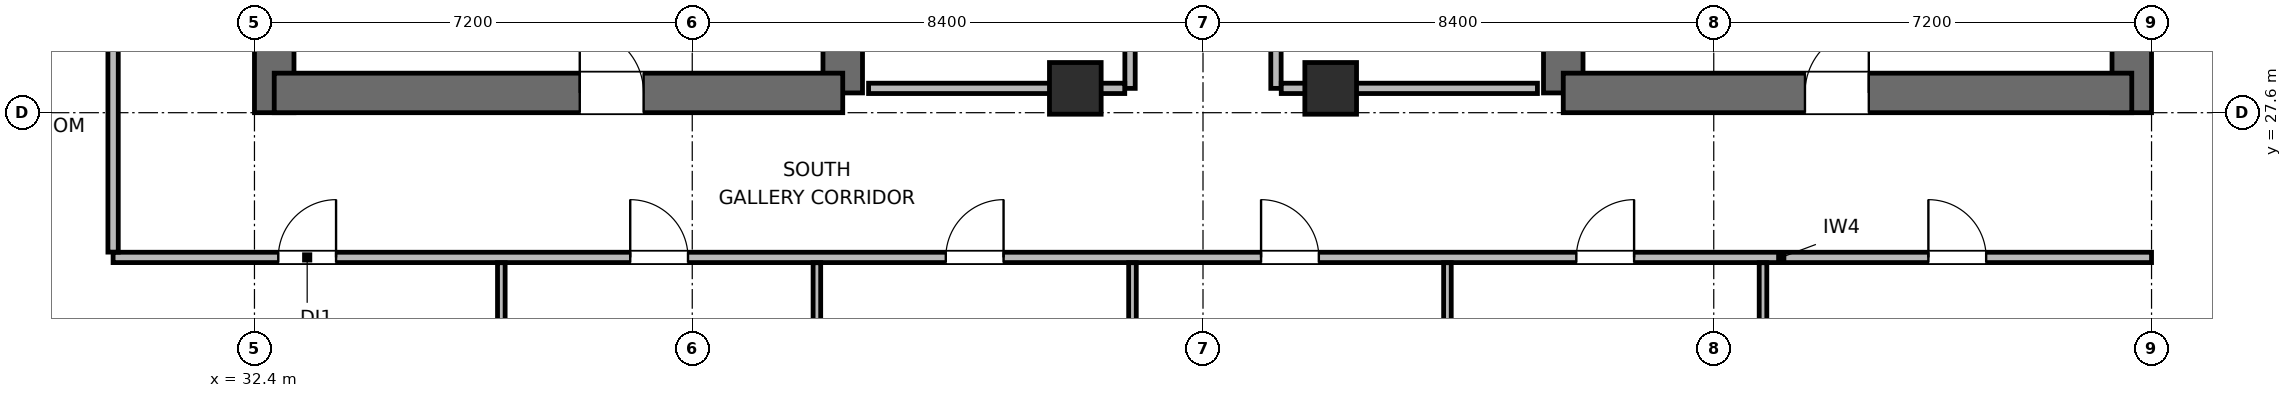
"""IFC4 building model, lengths in metres.
Left out: names, types, materials, properties, quantities, classifications, styles, units other than length and angle.
Written with IfcOpenShell. Run it as: python <this file> out.ifc"""

import sys

from ifc_helpers import new_model, si_unit, direction, frame, frame_2d, origin, origin_2d, place, context, subcontext, project, spatial, rectangle, extrude, element, fill, save


model = new_model("IFC4")
c1 = context("Model", 3, precision=1e-05, world=origin(), true_north=direction((0.0, 1.0)))
c2 = subcontext(c1, "Body", "Model", "MODEL_VIEW")
j1 = project(units=[si_unit("LENGTHUNIT", "METRE"), si_unit("PLANEANGLEUNIT", "RADIAN")], contexts=[c1])
p1 = place(None, origin())
s1 = spatial("IfcSite", under=j1, at=p1, CompositionType="ELEMENT")
p2 = place(p1, origin())
s2 = spatial("IfcBuilding", under=s1, at=p2, CompositionType="ELEMENT")
p3 = place(p2, frame((0.0, 0.0, 247.2)))
s3 = spatial("IfcBuildingStorey", under=s2, at=p3, CompositionType="ELEMENT", Elevation=247.2)
p4 = place(p3, frame((32.725, 27.6, 0.0), z_axis=(0.0, 0.0, 1.0), x_axis=(0.0, 1.0, 0.0)))
e1 = element("IfcWall", 1, at=p4, inside=s3, PredefinedType="SHEAR", context=c2, shape_type="SweptSolid", body=[
    extrude(rectangle(XDim=16.8, YDim=0.65, at=frame_2d((8.4, 0.0))), origin(), (0.0, 0.0, 1.0), 3.9),
])
p5 = place(p3, frame((42.075, 27.925, 0.0), z_axis=(0.0, 0.0, 1.0), x_axis=(0.0, 1.0, 0.0)))
e2 = element("IfcWall", 2, at=p5, inside=s3, PredefinedType="SHEAR", context=c2, shape_type="SweptSolid", body=[
    extrude(rectangle(XDim=6.475, YDim=0.65, at=frame_2d((3.237, 0.0))), origin(), (0.0, 0.0, 1.0), 3.9),
])
p6 = place(p3, frame((32.725, 27.925, 0.0), z_axis=(0.0, 0.0, 1.0), x_axis=(1.0, 0.0, 0.0)))
e3 = element("IfcWall", 3, at=p6, inside=s3, PredefinedType="SHEAR", context=c2, shape_type="SweptSolid", body=[
    extrude(rectangle(XDim=9.35, YDim=0.65, at=frame_2d((4.675, 0.0))), origin(), (0.0, 0.0, 1.0), 3.9),
])
p7 = place(p6, frame((5.025, 0.0, 0.0)))
e4 = element("IfcOpeningElement", 4, at=p7, cuts=e3, PredefinedType="OPENING", context=c2, shape_type="SweptSolid", body=[
    extrude(rectangle(XDim=1.05, YDim=2.04, at=frame_2d((0.525, 1.02))), frame((0.0, 0.335, 0.0), z_axis=(0.0, -1.0, 0.0), x_axis=(1.0, 0.0, 0.0)), (0.0, 0.0, 1.0), 0.67),
])
p8 = place(p3, frame((53.925, 27.925, 0.0), z_axis=(0.0, 0.0, 1.0), x_axis=(0.0, 1.0, 0.0)))
e5 = element("IfcWall", 5, at=p8, inside=s3, PredefinedType="SHEAR", context=c2, shape_type="SweptSolid", body=[
    extrude(rectangle(XDim=7.875, YDim=0.65, at=frame_2d((3.938, 0.0))), origin(), (0.0, 0.0, 1.0), 3.9),
])
p9 = place(p3, frame((63.275, 27.6, 0.0), z_axis=(0.0, 0.0, 1.0), x_axis=(0.0, 1.0, 0.0)))
e6 = element("IfcWall", 6, at=p9, inside=s3, PredefinedType="SHEAR", context=c2, shape_type="SweptSolid", body=[
    extrude(rectangle(XDim=16.8, YDim=0.65, at=frame_2d((8.4, 0.0))), origin(), (0.0, 0.0, 1.0), 3.9),
])
p10 = place(p3, frame((53.925, 27.925, 0.0), z_axis=(0.0, 0.0, 1.0), x_axis=(1.0, 0.0, 0.0)))
e7 = element("IfcWall", 7, at=p10, inside=s3, PredefinedType="SHEAR", context=c2, shape_type="SweptSolid", body=[
    extrude(rectangle(XDim=9.35, YDim=0.65, at=frame_2d((4.675, 0.0))), origin(), (0.0, 0.0, 1.0), 3.9),
])
p11 = place(p10, frame((3.975, 0.0, 0.0)))
e8 = element("IfcOpeningElement", 8, at=p11, cuts=e7, PredefinedType="OPENING", context=c2, shape_type="SweptSolid", body=[
    extrude(rectangle(XDim=1.05, YDim=2.04, at=frame_2d((0.525, 1.02))), frame((0.0, 0.335, 0.0), z_axis=(0.0, -1.0, 0.0), x_axis=(1.0, 0.0, 0.0)), (0.0, 0.0, 1.0), 0.67),
])
for number, where, z_axis, x_axis in (
    (9, (45.9, 28.0, 0.0), (0.0, 0.0, 1.0), (1.0, 0.0, 0.0)),
    (10, (50.1, 28.0, 0.0), (0.0, 0.0, 1.0), (1.0, 0.0, 0.0)),
):
    element("IfcColumn", number, at=place(p3, frame(where, z_axis=z_axis, x_axis=x_axis)), inside=s3, PredefinedType="COLUMN", context=c2, shape_type="SweptSolid", body=[
        extrude(rectangle(XDim=0.85, YDim=0.85, at=origin_2d()), origin(), (0.0, 0.0, 1.0), 3.9),
    ])
p12 = place(p3, frame((46.8, 28.0, 0.0), z_axis=(0.0, 0.0, 1.0), x_axis=(0.0, 1.0, 0.0)))
e11 = element("IfcWall", 11, at=p12, inside=s3, PredefinedType="PARTITIONING", context=c2, shape_type="SweptSolid", body=[
    extrude(rectangle(XDim=4.5, YDim=0.17, at=frame_2d((2.25, 0.0))), origin(), (0.0, 0.0, 1.0), 3.68),
])
p13 = place(p12, frame((0.675, 0.0, 0.0)))
e12 = element("IfcOpeningElement", 12, at=p13, cuts=e11, PredefinedType="OPENING", context=c2, shape_type="SweptSolid", body=[
    extrude(rectangle(XDim=0.9, YDim=2.02, at=frame_2d((0.45, 1.01))), frame((0.0, 0.095, 0.0), z_axis=(0.0, -1.0, 0.0), x_axis=(1.0, 0.0, 0.0)), (0.0, 0.0, 1.0), 0.19),
])
p14 = place(p12, frame((2.925, 0.0, 0.0)))
e13 = element("IfcOpeningElement", 13, at=p14, cuts=e11, PredefinedType="OPENING", context=c2, shape_type="SweptSolid", body=[
    extrude(rectangle(XDim=0.9, YDim=2.02, at=frame_2d((0.45, 1.01))), frame((0.0, 0.095, 0.0), z_axis=(0.0, -1.0, 0.0), x_axis=(1.0, 0.0, 0.0)), (0.0, 0.0, 1.0), 0.19),
])
p15 = place(p3, frame((42.5, 28.0, 0.0), z_axis=(0.0, 0.0, 1.0), x_axis=(1.0, 0.0, 0.0)))
e14 = element("IfcWall", 14, at=p15, inside=s3, PredefinedType="PARTITIONING", context=c2, shape_type="SweptSolid", body=[
    extrude(rectangle(XDim=4.213, YDim=0.17, at=frame_2d((2.106, 0.0))), origin(), (0.0, 0.0, 1.0), 2.765),
])
p16 = place(p3, frame((49.2, 28.0, 0.0), z_axis=(0.0, 0.0, 1.0), x_axis=(0.0, 1.0, 0.0)))
e15 = element("IfcWall", 15, at=p16, inside=s3, PredefinedType="PARTITIONING", context=c2, shape_type="SweptSolid", body=[
    extrude(rectangle(XDim=4.5, YDim=0.17, at=frame_2d((2.25, 0.0))), origin(), (0.0, 0.0, 1.0), 3.68),
])
p17 = place(p16, frame((1.8, 0.0, 0.0)))
e16 = element("IfcOpeningElement", 16, at=p17, cuts=e15, PredefinedType="OPENING", context=c2, shape_type="SweptSolid", body=[
    extrude(rectangle(XDim=0.9, YDim=2.02, at=frame_2d((0.45, 1.01))), frame((0.0, 0.095, 0.0), z_axis=(0.0, -1.0, 0.0), x_axis=(1.0, 0.0, 0.0)), (0.0, 0.0, 1.0), 0.19),
])
p18 = place(p3, frame((49.287, 28.0, 0.0), z_axis=(0.0, 0.0, 1.0), x_axis=(1.0, 0.0, 0.0)))
e17 = element("IfcWall", 17, at=p18, inside=s3, PredefinedType="PARTITIONING", context=c2, shape_type="SweptSolid", body=[
    extrude(rectangle(XDim=4.213, YDim=0.17, at=frame_2d((2.106, 0.0))), origin(), (0.0, 0.0, 1.0), 2.765),
])
p19 = place(p3, frame((30.075, 25.22, 0.0), z_axis=(0.0, 0.0, 1.0), x_axis=(1.0, 0.0, 0.0)))
e18 = element("IfcWall", 18, at=p19, inside=s3, PredefinedType="PARTITIONING", context=c2, shape_type="SweptSolid", body=[
    extrude(rectangle(XDim=33.525, YDim=0.17, at=frame_2d((16.763, 0.0))), origin(), (0.0, 0.0, 1.0), 3.68),
])
p20 = place(p19, frame((2.717, 0.0, 0.0)))
e19 = element("IfcOpeningElement", 19, at=p20, cuts=e18, PredefinedType="OPENING", context=c2, shape_type="SweptSolid", body=[
    extrude(rectangle(XDim=0.95, YDim=2.04, at=frame_2d((0.475, 1.02))), frame((0.0, 0.095, 0.0), z_axis=(0.0, -1.0, 0.0), x_axis=(1.0, 0.0, 0.0)), (0.0, 0.0, 1.0), 0.19),
])
p21 = place(p19, frame((8.505, 0.0, 0.0)))
e20 = element("IfcOpeningElement", 20, at=p21, cuts=e18, PredefinedType="OPENING", context=c2, shape_type="SweptSolid", body=[
    extrude(rectangle(XDim=0.95, YDim=2.04, at=frame_2d((0.475, 1.02))), frame((0.0, 0.095, 0.0), z_axis=(0.0, -1.0, 0.0), x_axis=(1.0, 0.0, 0.0)), (0.0, 0.0, 1.0), 0.19),
])
p22 = place(p19, frame((13.695, 0.0, 0.0)))
e21 = element("IfcOpeningElement", 21, at=p22, cuts=e18, PredefinedType="OPENING", context=c2, shape_type="SweptSolid", body=[
    extrude(rectangle(XDim=0.95, YDim=2.04, at=frame_2d((0.475, 1.02))), frame((0.0, 0.095, 0.0), z_axis=(0.0, -1.0, 0.0), x_axis=(1.0, 0.0, 0.0)), (0.0, 0.0, 1.0), 0.19),
])
p23 = place(p19, frame((18.88, 0.0, 0.0)))
e22 = element("IfcOpeningElement", 22, at=p23, cuts=e18, PredefinedType="OPENING", context=c2, shape_type="SweptSolid", body=[
    extrude(rectangle(XDim=0.95, YDim=2.04, at=frame_2d((0.475, 1.02))), frame((0.0, 0.095, 0.0), z_axis=(0.0, -1.0, 0.0), x_axis=(1.0, 0.0, 0.0)), (0.0, 0.0, 1.0), 0.19),
])
p24 = place(p19, frame((24.065, 0.0, 0.0)))
e23 = element("IfcOpeningElement", 23, at=p24, cuts=e18, PredefinedType="OPENING", context=c2, shape_type="SweptSolid", body=[
    extrude(rectangle(XDim=0.95, YDim=2.04, at=frame_2d((0.475, 1.02))), frame((0.0, 0.095, 0.0), z_axis=(0.0, -1.0, 0.0), x_axis=(1.0, 0.0, 0.0)), (0.0, 0.0, 1.0), 0.19),
])
p25 = place(p19, frame((29.855, 0.0, 0.0)))
e24 = element("IfcOpeningElement", 24, at=p25, cuts=e18, PredefinedType="OPENING", context=c2, shape_type="SweptSolid", body=[
    extrude(rectangle(XDim=0.95, YDim=2.04, at=frame_2d((0.475, 1.02))), frame((0.0, 0.095, 0.0), z_axis=(0.0, -1.0, 0.0), x_axis=(1.0, 0.0, 0.0)), (0.0, 0.0, 1.0), 0.19),
])
p26 = place(p3, frame((30.075, 25.307, 0.0), z_axis=(0.0, 0.0, 1.0), x_axis=(0.0, 1.0, 0.0)))
e25 = element("IfcWall", 25, at=p26, inside=s3, PredefinedType="PARTITIONING", context=c2, shape_type="SweptSolid", body=[
    extrude(rectangle(XDim=21.386, YDim=0.17, at=frame_2d((10.693, 0.0))), origin(), (0.0, 0.0, 1.0), 3.68),
])
p27 = place(p26, frame((4.428, 0.0, 0.0)))
e26 = element("IfcOpeningElement", 26, at=p27, cuts=e25, PredefinedType="OPENING", context=c2, shape_type="SweptSolid", body=[
    extrude(rectangle(XDim=0.95, YDim=2.04, at=frame_2d((0.475, 1.02))), frame((0.0, 0.095, 0.0), z_axis=(0.0, -1.0, 0.0), x_axis=(1.0, 0.0, 0.0)), (0.0, 0.0, 1.0), 0.19),
])
p28 = place(p26, frame((15.208, 0.0, 0.0)))
e27 = element("IfcOpeningElement", 27, at=p28, cuts=e25, PredefinedType="OPENING", context=c2, shape_type="SweptSolid", body=[
    extrude(rectangle(XDim=0.95, YDim=2.04, at=frame_2d((0.475, 1.02))), frame((0.0, 0.095, 0.0), z_axis=(0.0, -1.0, 0.0), x_axis=(1.0, 0.0, 0.0)), (0.0, 0.0, 1.0), 0.19),
])
p29 = place(p3, frame((36.46, 18.875, 0.0), z_axis=(0.0, 0.0, 1.0), x_axis=(0.0, 1.0, 0.0)))
e28 = element("IfcWall", 28, at=p29, inside=s3, PredefinedType="PARTITIONING", context=c2, shape_type="SweptSolid", body=[
    extrude(rectangle(XDim=6.258, YDim=0.125, at=frame_2d((3.129, 0.0))), origin(), (0.0, 0.0, 1.0), 3.68),
])
p30 = place(p3, frame((41.65, 19.049, 0.0), z_axis=(0.0, 0.0, 1.0), x_axis=(0.0, 1.0, 0.0)))
e29 = element("IfcWall", 29, at=p30, inside=s3, PredefinedType="PARTITIONING", context=c2, shape_type="SweptSolid", body=[
    extrude(rectangle(XDim=6.084, YDim=0.125, at=frame_2d((3.042, 0.0))), origin(), (0.0, 0.0, 1.0), 3.043),
])
p31 = place(p3, frame((46.84, 22.355, 0.0), z_axis=(0.0, 0.0, 1.0), x_axis=(0.0, 1.0, 0.0)))
e30 = element("IfcWall", 30, at=p31, inside=s3, PredefinedType="PARTITIONING", context=c2, shape_type="SweptSolid", body=[
    extrude(rectangle(XDim=2.778, YDim=0.125, at=frame_2d((1.389, 0.0))), origin(), (0.0, 0.0, 1.0), 3.68),
])
p32 = place(p3, frame((52.02, 20.283, 0.0), z_axis=(0.0, 0.0, 1.0), x_axis=(0.0, 1.0, 0.0)))
e31 = element("IfcWall", 31, at=p32, inside=s3, PredefinedType="PARTITIONING", context=c2, shape_type="SweptSolid", body=[
    extrude(rectangle(XDim=4.85, YDim=0.125, at=frame_2d((2.425, 0.0))), origin(), (0.0, 0.0, 1.0), 3.68),
])
p33 = place(p3, frame((57.21, 18.875, 0.0), z_axis=(0.0, 0.0, 1.0), x_axis=(0.0, 1.0, 0.0)))
e32 = element("IfcWall", 32, at=p33, inside=s3, PredefinedType="PARTITIONING", context=c2, shape_type="SweptSolid", body=[
    extrude(rectangle(XDim=6.258, YDim=0.125, at=frame_2d((3.129, 0.0))), origin(), (0.0, 0.0, 1.0), 3.68),
])
p34 = place(p7, origin())
e33 = element("IfcDoor", 33, at=p34, inside=s3, OperationType="SINGLE_SWING_LEFT", PredefinedType="DOOR", context=c2, shape_type="SweptSolid", body=[
    extrude(rectangle(XDim=1.05, YDim=2.04, at=frame_2d((0.525, 1.02))), frame((0.0, 0.025, 0.0), z_axis=(0.0, -1.0, 0.0), x_axis=(1.0, 0.0, 0.0)), (0.0, 0.0, 1.0), 0.05),
])
fill(e4, e33)
p35 = place(p11, origin())
e34 = element("IfcDoor", 34, at=p35, inside=s3, OperationType="SINGLE_SWING_RIGHT", PredefinedType="DOOR", context=c2, shape_type="SweptSolid", body=[
    extrude(rectangle(XDim=1.05, YDim=2.04, at=frame_2d((0.525, 1.02))), frame((0.0, 0.025, 0.0), z_axis=(0.0, -1.0, 0.0), x_axis=(1.0, 0.0, 0.0)), (0.0, 0.0, 1.0), 0.05),
])
fill(e8, e34)
p36 = place(p20, origin())
e35 = element("IfcDoor", 35, at=p36, inside=s3, OperationType="SINGLE_SWING_RIGHT", PredefinedType="DOOR", context=c2, shape_type="SweptSolid", body=[
    extrude(rectangle(XDim=0.95, YDim=2.04, at=frame_2d((0.475, 1.02))), frame((0.0, 0.025, 0.0), z_axis=(0.0, -1.0, 0.0), x_axis=(1.0, 0.0, 0.0)), (0.0, 0.0, 1.0), 0.05),
])
fill(e19, e35)
p37 = place(p21, origin())
e36 = element("IfcDoor", 36, at=p37, inside=s3, OperationType="SINGLE_SWING_LEFT", PredefinedType="DOOR", context=c2, shape_type="SweptSolid", body=[
    extrude(rectangle(XDim=0.95, YDim=2.04, at=frame_2d((0.475, 1.02))), frame((0.0, 0.025, 0.0), z_axis=(0.0, -1.0, 0.0), x_axis=(1.0, 0.0, 0.0)), (0.0, 0.0, 1.0), 0.05),
])
fill(e20, e36)
p38 = place(p22, origin())
e37 = element("IfcDoor", 37, at=p38, inside=s3, OperationType="SINGLE_SWING_RIGHT", PredefinedType="DOOR", context=c2, shape_type="SweptSolid", body=[
    extrude(rectangle(XDim=0.95, YDim=2.04, at=frame_2d((0.475, 1.02))), frame((0.0, 0.025, 0.0), z_axis=(0.0, -1.0, 0.0), x_axis=(1.0, 0.0, 0.0)), (0.0, 0.0, 1.0), 0.05),
])
fill(e21, e37)
p39 = place(p23, origin())
e38 = element("IfcDoor", 38, at=p39, inside=s3, OperationType="SINGLE_SWING_LEFT", PredefinedType="DOOR", context=c2, shape_type="SweptSolid", body=[
    extrude(rectangle(XDim=0.95, YDim=2.04, at=frame_2d((0.475, 1.02))), frame((0.0, 0.025, 0.0), z_axis=(0.0, -1.0, 0.0), x_axis=(1.0, 0.0, 0.0)), (0.0, 0.0, 1.0), 0.05),
])
fill(e22, e38)
p40 = place(p24, origin())
e39 = element("IfcDoor", 39, at=p40, inside=s3, OperationType="SINGLE_SWING_RIGHT", PredefinedType="DOOR", context=c2, shape_type="SweptSolid", body=[
    extrude(rectangle(XDim=0.95, YDim=2.04, at=frame_2d((0.475, 1.02))), frame((0.0, 0.025, 0.0), z_axis=(0.0, -1.0, 0.0), x_axis=(1.0, 0.0, 0.0)), (0.0, 0.0, 1.0), 0.05),
])
fill(e23, e39)
p41 = place(p25, origin())
e40 = element("IfcDoor", 40, at=p41, inside=s3, OperationType="SINGLE_SWING_LEFT", PredefinedType="DOOR", context=c2, shape_type="SweptSolid", body=[
    extrude(rectangle(XDim=0.95, YDim=2.04, at=frame_2d((0.475, 1.02))), frame((0.0, 0.025, 0.0), z_axis=(0.0, -1.0, 0.0), x_axis=(1.0, 0.0, 0.0)), (0.0, 0.0, 1.0), 0.05),
])
fill(e24, e40)
save(model, sys.argv[1])
